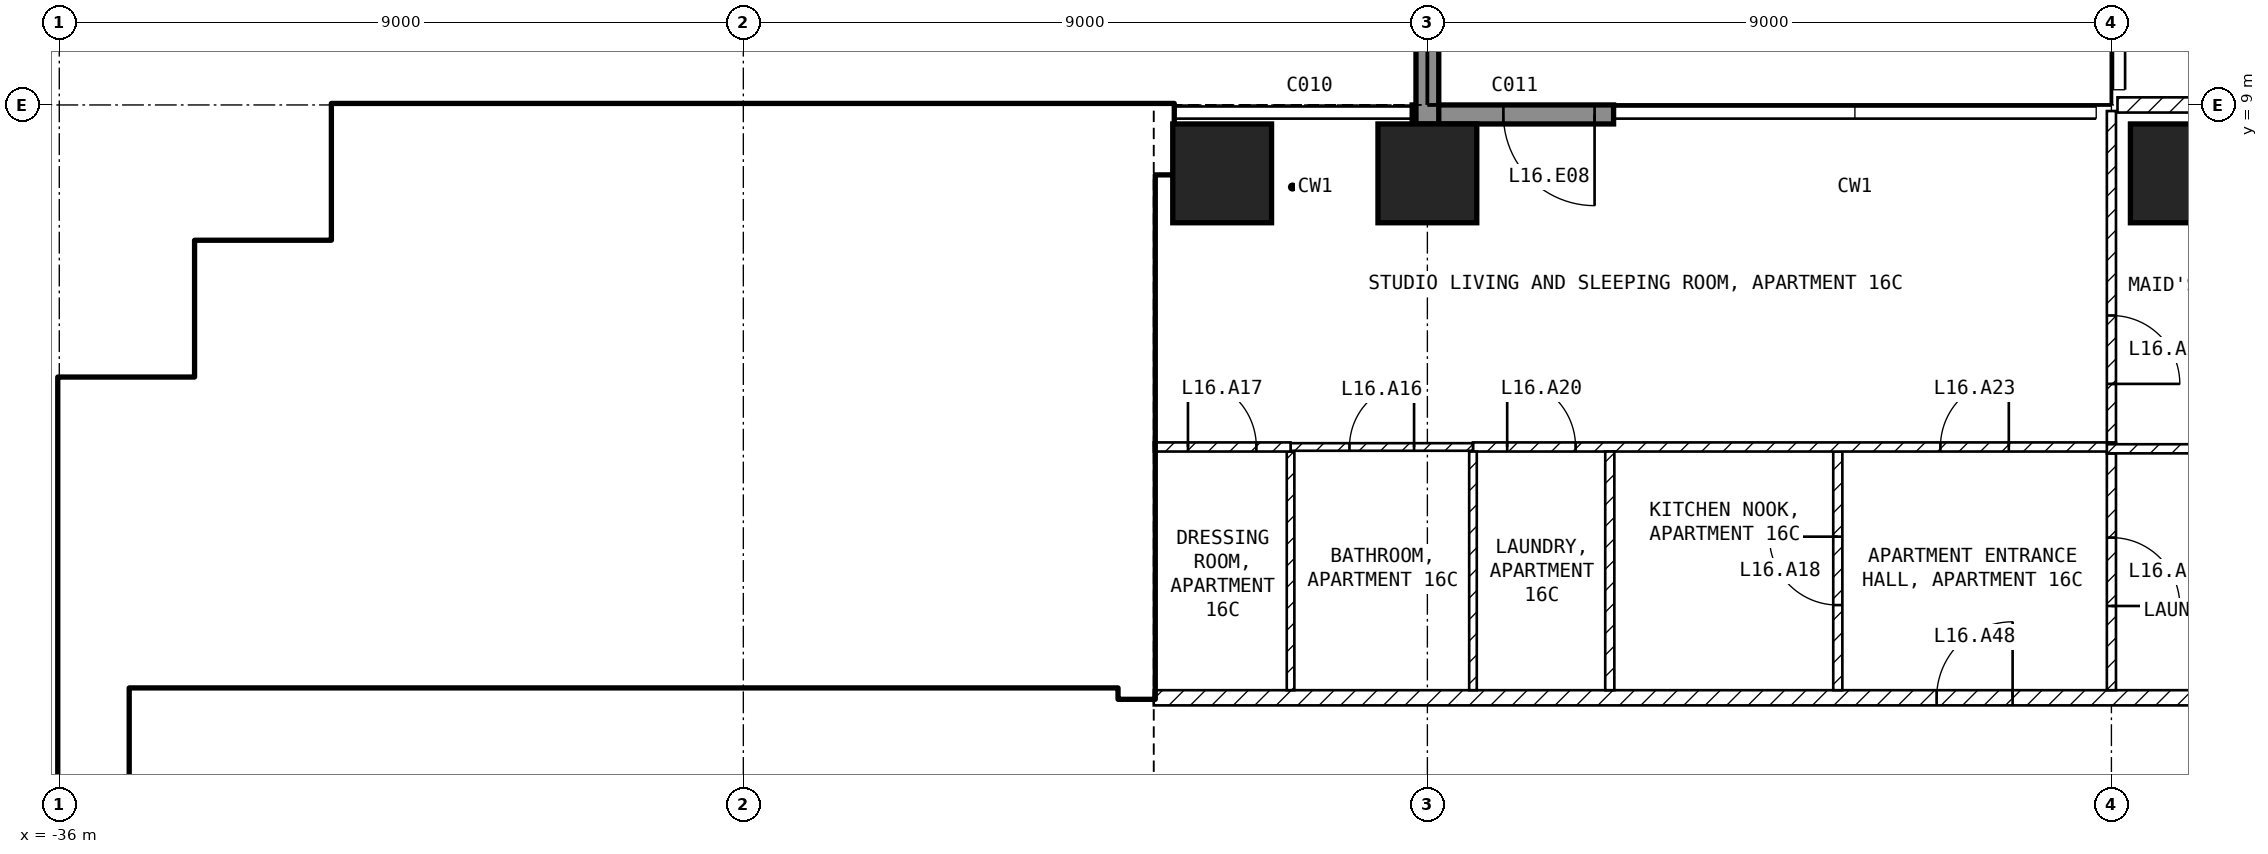
"""IFC4 building model, lengths in metres.
Left out: names, types, materials, properties, quantities, classifications, styles, units other than length and angle.
Written with IfcOpenShell. Run it as: python <this file> out.ifc"""

import sys

from ifc_helpers import new_model, si_unit, direction, frame, frame_2d, origin, origin_2d, place, context, subcontext, project, spatial, rectangle, extrude, element, fill, save


model = new_model("IFC4")
c1 = context("Model", 3, precision=1e-05, world=origin(), true_north=direction((0.0, 1.0)))
c2 = subcontext(c1, "Body", "Model", "MODEL_VIEW")
j1 = project(units=[si_unit("LENGTHUNIT", "METRE"), si_unit("PLANEANGLEUNIT", "RADIAN")], contexts=[c1])
p1 = place(None, origin())
s1 = spatial("IfcSite", under=j1, at=p1, CompositionType="ELEMENT")
p2 = place(p1, origin())
s2 = spatial("IfcBuilding", under=s1, at=p2, CompositionType="ELEMENT")
p3 = place(p2, frame((0.0, 0.0, 75.0)))
s3 = spatial("IfcBuildingStorey", under=s2, at=p3, CompositionType="ELEMENT", Elevation=75.0)
for number, where, z_axis, x_axis in (
    (1, (-20.7, 8.1, -0.25), (0.0, 0.0, 1.0), (1.0, 0.0, 0.0)),
    (2, (-18.0, 8.1, -0.25), (0.0, 0.0, 1.0), (1.0, 0.0, 0.0)),
    (3, (-8.1, 8.1, -0.25), (0.0, 0.0, 1.0), (1.0, 0.0, 0.0)),
):
    element("IfcColumn", number, at=place(p3, frame(where, z_axis=z_axis, x_axis=x_axis)), inside=s3, PredefinedType="COLUMN", context=c2, shape_type="SweptSolid", body=[
        extrude(rectangle(XDim=1.3, YDim=1.3, at=origin_2d()), origin(), (0.0, 0.0, 1.0), 3.5),
    ])
p4 = place(p3, frame((-15.55, 8.875, 0.0), z_axis=(0.0, 0.0, 1.0), x_axis=(-1.0, 0.0, 0.0)))
e4 = element("IfcWall", 4, at=p4, inside=s3, PredefinedType="SOLIDWALL", context=c2, shape_type="SweptSolid", body=[
    extrude(rectangle(XDim=2.65, YDim=0.25, at=frame_2d((1.325, 0.0))), origin(), (0.0, 0.0, 1.0), 3.25),
])
p5 = place(p4, frame((0.25, 0.0, 0.0)))
e5 = element("IfcOpeningElement", 5, at=p5, cuts=e4, PredefinedType="OPENING", context=c2, shape_type="SweptSolid", body=[
    extrude(rectangle(XDim=1.2, YDim=2.4, at=frame_2d((0.6, 1.2))), frame((0.0, 0.135, 0.0), z_axis=(0.0, -1.0, 0.0), x_axis=(1.0, 0.0, 0.0)), (0.0, 0.0, 1.0), 0.27),
])
p6 = place(p3, frame((-18.0, 8.75, 0.0), z_axis=(0.0, 0.0, 1.0), x_axis=(0.0, 1.0, 0.0)))
e6 = element("IfcWall", 6, at=p6, inside=s3, PredefinedType="SOLIDWALL", context=c2, shape_type="SweptSolid", body=[
    extrude(rectangle(XDim=2.95, YDim=0.3, at=frame_2d((1.475, 0.0))), origin(), (0.0, 0.0, 1.0), 3.25),
])
p7 = place(p3, frame((-35.55, -4.5, 0.0), z_axis=(0.0, 0.0, 1.0), x_axis=(0.0, 1.0, 0.0)))
e7 = element("IfcWall", 7, at=p7, inside=s3, PredefinedType="SHEAR", context=c2, shape_type="SweptSolid", body=[
    extrude(rectangle(XDim=9.9, YDim=0.9, at=frame_2d((4.95, 0.0))), origin(), (0.0, 0.0, 1.0), 3.25),
])
for number, where, z_axis, x_axis in (
    (8, (-35.1, 4.95, 0.0), (0.0, 0.0, 1.0), (1.0, 0.0, 0.0)),
    (9, (-33.75, 5.4, 0.0), (0.0, 0.0, 1.0), (0.0, 1.0, 0.0)),
    (10, (-33.3, 6.75, 0.0), (0.0, 0.0, 1.0), (1.0, 0.0, 0.0)),
    (11, (-31.95, 7.2, 0.0), (0.0, 0.0, 1.0), (0.0, 1.0, 0.0)),
):
    element("IfcWall", number, at=place(p3, frame(where, z_axis=z_axis, x_axis=x_axis)), inside=s3, PredefinedType="SHEAR", context=c2, shape_type="SweptSolid", body=[
        extrude(rectangle(XDim=1.8, YDim=0.9, at=frame_2d((0.9, 0.0))), origin(), (0.0, 0.0, 1.0), 3.25),
    ])
p8 = place(p3, frame((-31.5, 8.55, 0.0), z_axis=(0.0, 0.0, 1.0), x_axis=(1.0, 0.0, 0.0)))
e12 = element("IfcWall", 12, at=p8, inside=s3, PredefinedType="SHEAR", context=c2, shape_type="SweptSolid", body=[
    extrude(rectangle(XDim=10.15, YDim=0.9, at=frame_2d((5.075, 0.0))), origin(), (0.0, 0.0, 1.0), 3.25),
])
p9 = place(p3, frame((-21.825, 1.2, 0.0), z_axis=(0.0, 0.0, 1.0), x_axis=(0.0, 1.0, 0.0)))
e13 = element("IfcWall", 13, at=p9, inside=s3, PredefinedType="SHEAR", context=c2, shape_type="SweptSolid", body=[
    extrude(rectangle(XDim=6.9, YDim=0.45, at=frame_2d((3.45, 0.0))), origin(), (0.0, 0.0, 1.0), 3.25),
])
p10 = place(p3, frame((-35.1, 1.45, 0.0), z_axis=(0.0, 0.0, 1.0), x_axis=(1.0, 0.0, 0.0)))
e14 = element("IfcWall", 14, at=p10, inside=s3, PredefinedType="SOLIDWALL", context=c2, shape_type="SweptSolid", body=[
    extrude(rectangle(XDim=13.05, YDim=0.2, at=frame_2d((6.525, 0.0))), origin(), (0.0, 0.0, 1.0), 3.25),
])
p11 = place(p10, frame((11.3, 0.0, 0.0)))
e15 = element("IfcOpeningElement", 15, at=p11, cuts=e14, PredefinedType="OPENING", context=c2, shape_type="SweptSolid", body=[
    extrude(rectangle(XDim=1.0, YDim=2.1, at=frame_2d((0.5, 1.05))), frame((0.0, 0.11, 0.0), z_axis=(0.0, -1.0, 0.0), x_axis=(1.0, 0.0, 0.0)), (0.0, 0.0, 1.0), 0.22),
])
p12 = place(p10, frame((8.8, 0.0, 0.0)))
e16 = element("IfcOpeningElement", 16, at=p12, cuts=e14, PredefinedType="OPENING", context=c2, shape_type="SweptSolid", body=[
    extrude(rectangle(XDim=1.0, YDim=2.1, at=frame_2d((0.5, 1.05))), frame((0.0, 0.11, 0.0), z_axis=(0.0, -1.0, 0.0), x_axis=(1.0, 0.0, 0.0)), (0.0, 0.0, 1.0), 0.22),
])
p13 = place(p3, frame((-28.35, 5.15, 0.0), z_axis=(0.0, 0.0, 1.0), x_axis=(1.0, 0.0, 0.0)))
e17 = element("IfcWall", 17, at=p13, inside=s3, PredefinedType="SOLIDWALL", context=c2, shape_type="SweptSolid", body=[
    extrude(rectangle(XDim=6.3, YDim=0.2, at=frame_2d((3.15, 0.0))), origin(), (0.0, 0.0, 1.0), 3.25),
])
p14 = place(p13, frame((5.1, 0.0, 0.0)))
e18 = element("IfcOpeningElement", 18, at=p14, cuts=e17, PredefinedType="OPENING", context=c2, shape_type="SweptSolid", body=[
    extrude(rectangle(XDim=1.0, YDim=2.1, at=frame_2d((0.5, 1.05))), frame((0.0, 0.11, 0.0), z_axis=(0.0, -1.0, 0.0), x_axis=(1.0, 0.0, 0.0)), (0.0, 0.0, 1.0), 0.22),
])
p15 = place(p3, frame((-28.25, 5.25, 0.0), z_axis=(0.0, 0.0, 1.0), x_axis=(0.0, 1.0, 0.0)))
e19 = element("IfcWall", 19, at=p15, inside=s3, PredefinedType="SOLIDWALL", context=c2, shape_type="SweptSolid", body=[
    extrude(rectangle(XDim=2.85, YDim=0.2, at=frame_2d((1.425, 0.0))), origin(), (0.0, 0.0, 1.0), 3.25),
])
p16 = place(p3, frame((-35.1, 3.95, 0.0), z_axis=(0.0, 0.0, 1.0), x_axis=(1.0, 0.0, 0.0)))
e20 = element("IfcWall", 20, at=p16, inside=s3, PredefinedType="SOLIDWALL", context=c2, shape_type="SweptSolid", body=[
    extrude(rectangle(XDim=7.9, YDim=0.2, at=frame_2d((3.95, 0.0))), origin(), (0.0, 0.0, 1.0), 3.25),
])
p17 = place(p3, frame((-27.1, 1.55, 0.0), z_axis=(0.0, 0.0, 1.0), x_axis=(0.0, 1.0, 0.0)))
e21 = element("IfcWall", 21, at=p17, inside=s3, PredefinedType="SOLIDWALL", context=c2, shape_type="SweptSolid", body=[
    extrude(rectangle(XDim=3.5, YDim=0.2, at=frame_2d((1.75, 0.0))), origin(), (0.0, 0.0, 1.0), 3.25),
])
p18 = place(p17, frame((0.6, 0.0, 0.0)))
e22 = element("IfcOpeningElement", 22, at=p18, cuts=e21, PredefinedType="OPENING", context=c2, shape_type="SweptSolid", body=[
    extrude(rectangle(XDim=1.1, YDim=2.1, at=frame_2d((0.55, 1.05))), frame((0.0, 0.11, 0.0), z_axis=(0.0, -1.0, 0.0), x_axis=(1.0, 0.0, 0.0)), (0.0, 0.0, 1.0), 0.22),
])
p19 = place(p17, frame((2.6, 0.0, 0.0)))
e23 = element("IfcOpeningElement", 23, at=p19, cuts=e21, PredefinedType="OPENING", context=c2, shape_type="SweptSolid", body=[
    extrude(rectangle(XDim=0.8, YDim=2.1, at=frame_2d((0.4, 1.05))), frame((0.0, 0.11, 0.0), z_axis=(0.0, -1.0, 0.0), x_axis=(1.0, 0.0, 0.0)), (0.0, 0.0, 1.0), 0.22),
])
for number, where, z_axis, x_axis in (
    (24, (-30.0, 1.55, 0.0), (0.0, 0.0, 1.0), (0.0, 1.0, 0.0)),
    (25, (-32.3, 1.55, 0.0), (0.0, 0.0, 1.0), (0.0, 1.0, 0.0)),
    (26, (-35.0, 1.55, 0.0), (0.0, 0.0, 1.0), (0.0, 1.0, 0.0)),
):
    element("IfcWall", number, at=place(p3, frame(where, z_axis=z_axis, x_axis=x_axis)), inside=s3, PredefinedType="SOLIDWALL", context=c2, shape_type="SweptSolid", body=[
        extrude(rectangle(XDim=2.3, YDim=0.2, at=frame_2d((1.15, 0.0))), origin(), (0.0, 0.0, 1.0), 3.25),
    ])
p20 = place(p3, frame((-21.6, 1.2, 0.0), z_axis=(0.0, 0.0, 1.0), x_axis=(1.0, 0.0, 0.0)))
e27 = element("IfcWall", 27, at=p20, inside=s3, PredefinedType="PARTITIONING", context=c2, shape_type="SweptSolid", body=[
    extrude(rectangle(XDim=20.5, YDim=0.2, at=frame_2d((10.25, 0.0))), origin(), (0.0, 0.0, 1.0), 3.25),
])
p21 = place(p20, frame((10.3, 0.0, 0.0)))
e28 = element("IfcOpeningElement", 28, at=p21, cuts=e27, PredefinedType="OPENING", context=c2, shape_type="SweptSolid", body=[
    extrude(rectangle(XDim=1.0, YDim=2.1, at=frame_2d((0.5, 1.05))), frame((0.0, 0.11, 0.0), z_axis=(0.0, -1.0, 0.0), x_axis=(1.0, 0.0, 0.0)), (0.0, 0.0, 1.0), 0.22),
])
p22 = place(p3, frame((-8.92, 9.0, 0.0), z_axis=(0.0, 0.0, 1.0), x_axis=(1.0, 0.0, 0.0)))
e29 = element("IfcWall", 29, at=p22, inside=s3, PredefinedType="PARTITIONING", context=c2, shape_type="SweptSolid", body=[
    extrude(rectangle(XDim=17.84, YDim=0.2, at=frame_2d((8.92, 0.0))), origin(), (0.0, 0.0, 1.0), 3.25),
])
p23 = place(p22, frame((8.42, 0.0, 0.0)))
e30 = element("IfcOpeningElement", 30, at=p23, cuts=e29, PredefinedType="OPENING", context=c2, shape_type="SweptSolid", body=[
    extrude(rectangle(XDim=1.0, YDim=2.1, at=frame_2d((0.5, 1.05))), frame((0.0, 0.11, 0.0), z_axis=(0.0, -1.0, 0.0), x_axis=(1.0, 0.0, 0.0)), (0.0, 0.0, 1.0), 0.22),
])
p24 = place(p3, frame((-12.6, 1.3, 0.0), z_axis=(0.0, 0.0, 1.0), x_axis=(0.0, 1.0, 0.0)))
e31 = element("IfcWall", 31, at=p24, inside=s3, PredefinedType="PARTITIONING", context=c2, shape_type="SweptSolid", body=[
    extrude(rectangle(XDim=3.14, YDim=0.12, at=frame_2d((1.57, 0.0))), origin(), (0.0, 0.0, 1.0), 3.25),
])
p25 = place(p24, frame((1.12, 0.0, 0.0)))
e32 = element("IfcOpeningElement", 32, at=p25, cuts=e31, PredefinedType="OPENING", context=c2, shape_type="SweptSolid", body=[
    extrude(rectangle(XDim=0.9, YDim=2.1, at=frame_2d((0.45, 1.05))), frame((0.0, 0.07, 0.0), z_axis=(0.0, -1.0, 0.0), x_axis=(1.0, 0.0, 0.0)), (0.0, 0.0, 1.0), 0.14),
])
p26 = place(p3, frame((-17.4, 4.5, 0.0), z_axis=(0.0, 0.0, 1.0), x_axis=(1.0, 0.0, 0.0)))
e33 = element("IfcWall", 33, at=p26, inside=s3, PredefinedType="PARTITIONING", context=c2, shape_type="SweptSolid", body=[
    extrude(rectangle(XDim=8.46, YDim=0.12, at=frame_2d((4.23, 0.0))), origin(), (0.0, 0.0, 1.0), 3.25),
])
p27 = place(p26, frame((0.45, 0.0, 0.0)))
e34 = element("IfcOpeningElement", 34, at=p27, cuts=e33, PredefinedType="OPENING", context=c2, shape_type="SweptSolid", body=[
    extrude(rectangle(XDim=0.9, YDim=2.1, at=frame_2d((0.45, 1.05))), frame((0.0, 0.07, 0.0), z_axis=(0.0, -1.0, 0.0), x_axis=(1.0, 0.0, 0.0)), (0.0, 0.0, 1.0), 0.14),
])
p28 = place(p26, frame((6.15, 0.0, 0.0)))
e35 = element("IfcOpeningElement", 35, at=p28, cuts=e33, PredefinedType="OPENING", context=c2, shape_type="SweptSolid", body=[
    extrude(rectangle(XDim=0.9, YDim=2.1, at=frame_2d((0.45, 1.05))), frame((0.0, 0.07, 0.0), z_axis=(0.0, -1.0, 0.0), x_axis=(1.0, 0.0, 0.0)), (0.0, 0.0, 1.0), 0.14),
])
p29 = place(p3, frame((-9.0, 4.416, 0.0), z_axis=(0.0, 0.0, 1.0), x_axis=(0.0, -1.0, 0.0)))
e36 = element("IfcWall", 36, at=p29, inside=s3, PredefinedType="PARTITIONING", context=c2, shape_type="SweptSolid", body=[
    extrude(rectangle(XDim=3.116, YDim=0.12, at=frame_2d((1.558, 0.0))), origin(), (0.0, 0.0, 1.0), 3.25),
])
p30 = place(p29, frame((1.108, 0.0, 0.0)))
e37 = element("IfcOpeningElement", 37, at=p30, cuts=e36, PredefinedType="OPENING", context=c2, shape_type="SweptSolid", body=[
    extrude(rectangle(XDim=0.9, YDim=2.1, at=frame_2d((0.45, 1.05))), frame((0.0, 0.07, 0.0), z_axis=(0.0, -1.0, 0.0), x_axis=(1.0, 0.0, 0.0)), (0.0, 0.0, 1.0), 0.14),
])
p31 = place(p3, frame((-15.6, 1.3, 0.0), z_axis=(0.0, 0.0, 1.0), x_axis=(0.0, 1.0, 0.0)))
e38 = element("IfcWall", 38, at=p31, inside=s3, PredefinedType="PARTITIONING", context=c2, shape_type="SweptSolid", body=[
    extrude(rectangle(XDim=3.14, YDim=0.12, at=frame_2d((1.57, 0.0))), origin(), (0.0, 0.0, 1.0), 3.25),
])
for number, where, z_axis, x_axis in (
    (39, (-17.4, 1.3, 0.0), (0.0, 0.0, 1.0), (0.0, 1.0, 0.0)),
    (40, (-19.8, 1.3, 0.0), (0.0, 0.0, 1.0), (0.0, 1.0, 0.0)),
):
    element("IfcWall", number, at=place(p3, frame(where, z_axis=z_axis, x_axis=x_axis)), inside=s3, PredefinedType="PARTITIONING", context=c2, shape_type="SweptSolid", body=[
        extrude(rectangle(XDim=3.14, YDim=0.1, at=frame_2d((1.57, 0.0))), origin(), (0.0, 0.0, 1.0), 3.25),
    ])
p32 = place(p3, frame((-19.8, 4.5, 0.0), z_axis=(0.0, 0.0, 1.0), x_axis=(1.0, 0.0, 0.0)))
e41 = element("IfcWall", 41, at=p32, inside=s3, PredefinedType="PARTITIONING", context=c2, shape_type="SweptSolid", body=[
    extrude(rectangle(XDim=2.4, YDim=0.1, at=frame_2d((1.2, 0.0))), origin(), (0.0, 0.0, 1.0), 3.25),
])
p33 = place(p32, frame((0.775, 0.0, 0.0)))
e42 = element("IfcOpeningElement", 42, at=p33, cuts=e41, PredefinedType="OPENING", context=c2, shape_type="SweptSolid", body=[
    extrude(rectangle(XDim=0.85, YDim=2.1, at=frame_2d((0.425, 1.05))), frame((0.0, 0.06, 0.0), z_axis=(0.0, -1.0, 0.0), x_axis=(1.0, 0.0, 0.0)), (0.0, 0.0, 1.0), 0.12),
])
p34 = place(p3, frame((-21.6, 4.5, 0.0), z_axis=(0.0, 0.0, 1.0), x_axis=(1.0, 0.0, 0.0)))
e43 = element("IfcWall", 43, at=p34, inside=s3, PredefinedType="PARTITIONING", context=c2, shape_type="SweptSolid", body=[
    extrude(rectangle(XDim=1.8, YDim=0.12, at=frame_2d((0.9, 0.0))), origin(), (0.0, 0.0, 1.0), 3.25),
])
p35 = place(p34, frame((0.45, 0.0, 0.0)))
e44 = element("IfcOpeningElement", 44, at=p35, cuts=e43, PredefinedType="OPENING", context=c2, shape_type="SweptSolid", body=[
    extrude(rectangle(XDim=0.9, YDim=2.1, at=frame_2d((0.45, 1.05))), frame((0.0, 0.07, 0.0), z_axis=(0.0, -1.0, 0.0), x_axis=(1.0, 0.0, 0.0)), (0.0, 0.0, 1.0), 0.14),
])
p36 = place(p3, frame((-9.0, 8.92, 0.0), z_axis=(0.0, 0.0, 1.0), x_axis=(0.0, -1.0, 0.0)))
e45 = element("IfcWall", 45, at=p36, inside=s3, PredefinedType="PARTITIONING", context=c2, shape_type="SweptSolid", body=[
    extrude(rectangle(XDim=4.36, YDim=0.12, at=frame_2d((2.18, 0.0))), origin(), (0.0, 0.0, 1.0), 3.25),
])
p37 = place(p36, frame((2.69, 0.0, 0.0)))
e46 = element("IfcOpeningElement", 46, at=p37, cuts=e45, PredefinedType="OPENING", context=c2, shape_type="SweptSolid", body=[
    extrude(rectangle(XDim=0.9, YDim=2.1, at=frame_2d((0.45, 1.05))), frame((0.0, 0.07, 0.0), z_axis=(0.0, -1.0, 0.0), x_axis=(1.0, 0.0, 0.0)), (0.0, 0.0, 1.0), 0.14),
])
p38 = place(p3, frame((-9.06, 4.476, 0.0), z_axis=(0.0, 0.0, 1.0), x_axis=(1.0, 0.0, 0.0)))
e47 = element("IfcWall", 47, at=p38, inside=s3, PredefinedType="PARTITIONING", context=c2, shape_type="SweptSolid", body=[
    extrude(rectangle(XDim=4.62, YDim=0.12, at=frame_2d((2.31, 0.0))), origin(), (0.0, 0.0, 1.0), 3.25),
])
p39 = place(p5, origin())
e48 = element("IfcDoor", 48, at=p39, inside=s3, OperationType="SINGLE_SWING_LEFT", PredefinedType="DOOR", context=c2, shape_type="SweptSolid", body=[
    extrude(rectangle(XDim=1.2, YDim=2.4, at=frame_2d((0.6, 1.2))), frame((0.0, 0.025, 0.0), z_axis=(0.0, -1.0, 0.0), x_axis=(1.0, 0.0, 0.0)), (0.0, 0.0, 1.0), 0.05),
])
fill(e5, e48)
p40 = place(p18, origin())
e49 = element("IfcDoor", 49, at=p40, inside=s3, OperationType="DOUBLE_DOOR_SLIDING", PredefinedType="DOOR", context=c2, shape_type="SweptSolid", body=[
    extrude(rectangle(XDim=1.1, YDim=2.1, at=frame_2d((0.55, 1.05))), frame((0.0, 0.025, 0.0), z_axis=(0.0, -1.0, 0.0), x_axis=(1.0, 0.0, 0.0)), (0.0, 0.0, 1.0), 0.05),
])
fill(e22, e49)
p41 = place(p14, origin())
e50 = element("IfcDoor", 50, at=p41, inside=s3, OperationType="SINGLE_SWING_LEFT", PredefinedType="DOOR", context=c2, shape_type="SweptSolid", body=[
    extrude(rectangle(XDim=1.0, YDim=2.1, at=frame_2d((0.5, 1.05))), frame((0.0, 0.025, 0.0), z_axis=(0.0, -1.0, 0.0), x_axis=(1.0, 0.0, 0.0)), (0.0, 0.0, 1.0), 0.05),
])
fill(e18, e50)
p42 = place(p11, origin())
e51 = element("IfcDoor", 51, at=p42, inside=s3, OperationType="SINGLE_SWING_LEFT", PredefinedType="DOOR", context=c2, shape_type="SweptSolid", body=[
    extrude(rectangle(XDim=1.0, YDim=2.1, at=frame_2d((0.5, 1.05))), frame((0.0, 0.025, 0.0), z_axis=(0.0, -1.0, 0.0), x_axis=(1.0, 0.0, 0.0)), (0.0, 0.0, 1.0), 0.05),
])
fill(e15, e51)
p43 = place(p12, origin())
e52 = element("IfcDoor", 52, at=p43, inside=s3, OperationType="SINGLE_SWING_LEFT", PredefinedType="DOOR", context=c2, shape_type="SweptSolid", body=[
    extrude(rectangle(XDim=1.0, YDim=2.1, at=frame_2d((0.5, 1.05))), frame((0.0, 0.025, 0.0), z_axis=(0.0, -1.0, 0.0), x_axis=(1.0, 0.0, 0.0)), (0.0, 0.0, 1.0), 0.05),
])
fill(e16, e52)
p44 = place(p19, origin())
e53 = element("IfcDoor", 53, at=p44, inside=s3, OperationType="SINGLE_SWING_LEFT", PredefinedType="DOOR", context=c2, shape_type="SweptSolid", body=[
    extrude(rectangle(XDim=0.8, YDim=2.1, at=frame_2d((0.4, 1.05))), frame((0.0, 0.025, 0.0), z_axis=(0.0, -1.0, 0.0), x_axis=(1.0, 0.0, 0.0)), (0.0, 0.0, 1.0), 0.05),
])
fill(e23, e53)
p45 = place(p33, origin())
e54 = element("IfcDoor", 54, at=p45, inside=s3, OperationType="SINGLE_SWING_RIGHT", PredefinedType="DOOR", context=c2, shape_type="SweptSolid", body=[
    extrude(rectangle(XDim=0.85, YDim=2.1, at=frame_2d((0.425, 1.05))), frame((0.0, 0.025, 0.0), z_axis=(0.0, -1.0, 0.0), x_axis=(1.0, 0.0, 0.0)), (0.0, 0.0, 1.0), 0.05),
])
fill(e42, e54)
p46 = place(p35, origin())
e55 = element("IfcDoor", 55, at=p46, inside=s3, OperationType="SINGLE_SWING_LEFT", PredefinedType="DOOR", context=c2, shape_type="SweptSolid", body=[
    extrude(rectangle(XDim=0.9, YDim=2.1, at=frame_2d((0.45, 1.05))), frame((0.0, 0.025, 0.0), z_axis=(0.0, -1.0, 0.0), x_axis=(1.0, 0.0, 0.0)), (0.0, 0.0, 1.0), 0.05),
])
fill(e44, e55)
p47 = place(p25, origin())
e56 = element("IfcDoor", 56, at=p47, inside=s3, OperationType="SINGLE_SWING_RIGHT", PredefinedType="DOOR", context=c2, shape_type="SweptSolid", body=[
    extrude(rectangle(XDim=0.9, YDim=2.1, at=frame_2d((0.45, 1.05))), frame((0.0, 0.025, 0.0), z_axis=(0.0, -1.0, 0.0), x_axis=(1.0, 0.0, 0.0)), (0.0, 0.0, 1.0), 0.05),
])
fill(e32, e56)
p48 = place(p30, origin())
e57 = element("IfcDoor", 57, at=p48, inside=s3, OperationType="SINGLE_SWING_RIGHT", PredefinedType="DOOR", context=c2, shape_type="SweptSolid", body=[
    extrude(rectangle(XDim=0.9, YDim=2.1, at=frame_2d((0.45, 1.05))), frame((0.0, 0.025, 0.0), z_axis=(0.0, -1.0, 0.0), x_axis=(1.0, 0.0, 0.0)), (0.0, 0.0, 1.0), 0.05),
])
fill(e37, e57)
p49 = place(p27, origin())
e58 = element("IfcDoor", 58, at=p49, inside=s3, OperationType="SINGLE_SWING_LEFT", PredefinedType="DOOR", context=c2, shape_type="SweptSolid", body=[
    extrude(rectangle(XDim=0.9, YDim=2.1, at=frame_2d((0.45, 1.05))), frame((0.0, 0.025, 0.0), z_axis=(0.0, -1.0, 0.0), x_axis=(1.0, 0.0, 0.0)), (0.0, 0.0, 1.0), 0.05),
])
fill(e34, e58)
p50 = place(p37, origin())
e59 = element("IfcDoor", 59, at=p50, inside=s3, OperationType="SINGLE_SWING_RIGHT", PredefinedType="DOOR", context=c2, shape_type="SweptSolid", body=[
    extrude(rectangle(XDim=0.9, YDim=2.1, at=frame_2d((0.45, 1.05))), frame((0.0, 0.025, 0.0), z_axis=(0.0, -1.0, 0.0), x_axis=(1.0, 0.0, 0.0)), (0.0, 0.0, 1.0), 0.05),
])
fill(e46, e59)
p51 = place(p28, origin())
e60 = element("IfcDoor", 60, at=p51, inside=s3, OperationType="SINGLE_SWING_RIGHT", PredefinedType="DOOR", context=c2, shape_type="SweptSolid", body=[
    extrude(rectangle(XDim=0.9, YDim=2.1, at=frame_2d((0.45, 1.05))), frame((0.0, 0.025, 0.0), z_axis=(0.0, -1.0, 0.0), x_axis=(1.0, 0.0, 0.0)), (0.0, 0.0, 1.0), 0.05),
])
fill(e35, e60)
p52 = place(p21, origin())
e61 = element("IfcDoor", 61, at=p52, inside=s3, OperationType="SINGLE_SWING_RIGHT", PredefinedType="DOOR", context=c2, shape_type="SweptSolid", body=[
    extrude(rectangle(XDim=1.0, YDim=2.1, at=frame_2d((0.5, 1.05))), frame((0.0, 0.025, 0.0), z_axis=(0.0, -1.0, 0.0), x_axis=(1.0, 0.0, 0.0)), (0.0, 0.0, 1.0), 0.05),
])
fill(e28, e61)
save(model, sys.argv[1])
